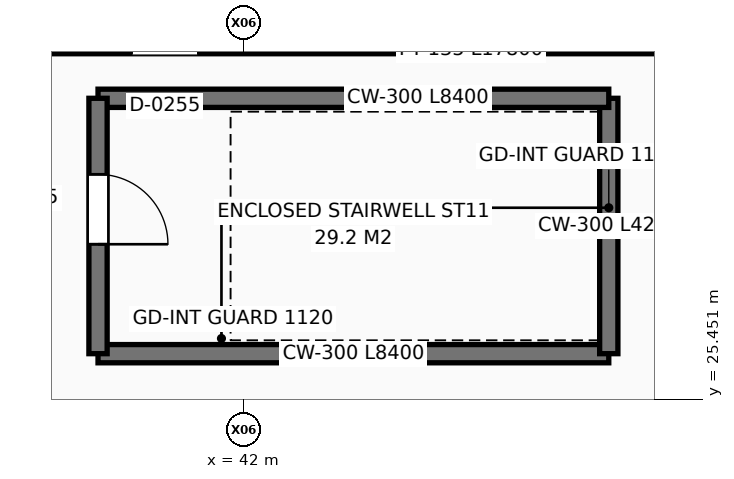
"""IFC4 building model, lengths in metres.
Left out: names, types, materials, properties, quantities, classifications, styles, units other than length and angle.
Written with IfcOpenShell. Run it as: python <this file> out.ifc"""

import sys

from ifc_helpers import new_model, si_unit, direction, frame, frame_2d, origin, place, context, subcontext, project, spatial, rectangle, extrude, element, fill, save


model = new_model("IFC4")
c1 = context("Model", 3, precision=1e-05, world=origin(), true_north=direction((0.0, 1.0)))
c2 = subcontext(c1, "Body", "Model", "MODEL_VIEW")
j1 = project(units=[si_unit("LENGTHUNIT", "METRE"), si_unit("PLANEANGLEUNIT", "RADIAN")], contexts=[c1])
p1 = place(None, origin())
s1 = spatial("IfcSite", under=j1, at=p1, CompositionType="ELEMENT")
p2 = place(p1, origin())
s2 = spatial("IfcBuilding", under=s1, at=p2, CompositionType="ELEMENT")
p3 = place(p2, frame((0.0, 0.0, 18.0)))
s3 = spatial("IfcBuildingStorey", under=s2, at=p3, CompositionType="ELEMENT", Elevation=18.0)
p4 = place(p3, frame((39.6, 26.2, 0.0), z_axis=(0.0, 0.0, 1.0), x_axis=(1.0, 0.0, 0.0)))
e1 = element("IfcWall", 1, at=p4, inside=s3, PredefinedType="SHEAR", context=c2, shape_type="SweptSolid", body=[
    extrude(rectangle(XDim=8.4, YDim=0.3, at=frame_2d((4.2, 0.0))), origin(), (0.0, 0.0, 1.0), 3.92),
])
p5 = place(p3, frame((48.0, 26.2, 0.0), z_axis=(0.0, 0.0, 1.0), x_axis=(0.0, 1.0, 0.0)))
e2 = element("IfcWall", 2, at=p5, inside=s3, PredefinedType="SHEAR", context=c2, shape_type="SweptSolid", body=[
    extrude(rectangle(XDim=4.2, YDim=0.3, at=frame_2d((2.1, 0.0))), origin(), (0.0, 0.0, 1.0), 3.92),
])
p6 = place(p3, frame((48.0, 30.4, 0.0), z_axis=(0.0, 0.0, 1.0), x_axis=(-1.0, 0.0, 0.0)))
e3 = element("IfcWall", 3, at=p6, inside=s3, PredefinedType="SHEAR", context=c2, shape_type="SweptSolid", body=[
    extrude(rectangle(XDim=8.4, YDim=0.3, at=frame_2d((4.2, 0.0))), origin(), (0.0, 0.0, 1.0), 3.92),
])
p7 = place(p3, frame((39.6, 30.4, 0.0), z_axis=(0.0, 0.0, 1.0), x_axis=(0.0, -1.0, 0.0)))
e4 = element("IfcWall", 4, at=p7, inside=s3, PredefinedType="SHEAR", context=c2, shape_type="SweptSolid", body=[
    extrude(rectangle(XDim=4.2, YDim=0.3, at=frame_2d((2.1, 0.0))), origin(), (0.0, 0.0, 1.0), 3.92),
])
p8 = place(p7, frame((1.25, 0.0, 0.0)))
e5 = element("IfcOpeningElement", 5, at=p8, cuts=e4, PredefinedType="OPENING", context=c2, shape_type="SweptSolid", body=[
    extrude(rectangle(XDim=1.15, YDim=2.2, at=frame_2d((0.575, 1.1))), frame((0.0, 0.16, 0.0), z_axis=(0.0, -1.0, 0.0), x_axis=(1.0, 0.0, 0.0)), (0.0, 0.0, 1.0), 0.32),
])
p9 = place(p3, frame((31.8, 31.2, 0.0), z_axis=(0.0, 0.0, 1.0), x_axis=(1.0, 0.0, 0.0)))
e6 = element("IfcWall", 6, at=p9, inside=s3, PredefinedType="PARTITIONING", context=c2, shape_type="SweptSolid", body=[
    extrude(rectangle(XDim=17.8, YDim=0.135, at=frame_2d((8.9, 0.0))), origin(), (0.0, 0.0, 1.0), 3.86),
])
p10 = place(p9, frame((8.35, 0.0, 0.0)))
e7 = element("IfcOpeningElement", 7, at=p10, cuts=e6, PredefinedType="OPENING", context=c2, shape_type="SweptSolid", body=[
    extrude(rectangle(XDim=1.1, YDim=2.15, at=frame_2d((0.55, 1.075))), frame((0.0, 0.077, 0.0), z_axis=(0.0, -1.0, 0.0), x_axis=(1.0, 0.0, 0.0)), (0.0, 0.0, 1.0), 0.155),
])
p11 = place(p8, origin())
e8 = element("IfcDoor", 8, at=p11, inside=s3, OperationType="SINGLE_SWING_RIGHT", PredefinedType="DOOR", context=c2, shape_type="SweptSolid", body=[
    extrude(rectangle(XDim=1.15, YDim=2.2, at=frame_2d((0.575, 1.1))), frame((0.0, 0.025, 0.0), z_axis=(0.0, -1.0, 0.0), x_axis=(1.0, 0.0, 0.0)), (0.0, 0.0, 1.0), 0.05),
])
fill(e5, e8)
save(model, sys.argv[1])
